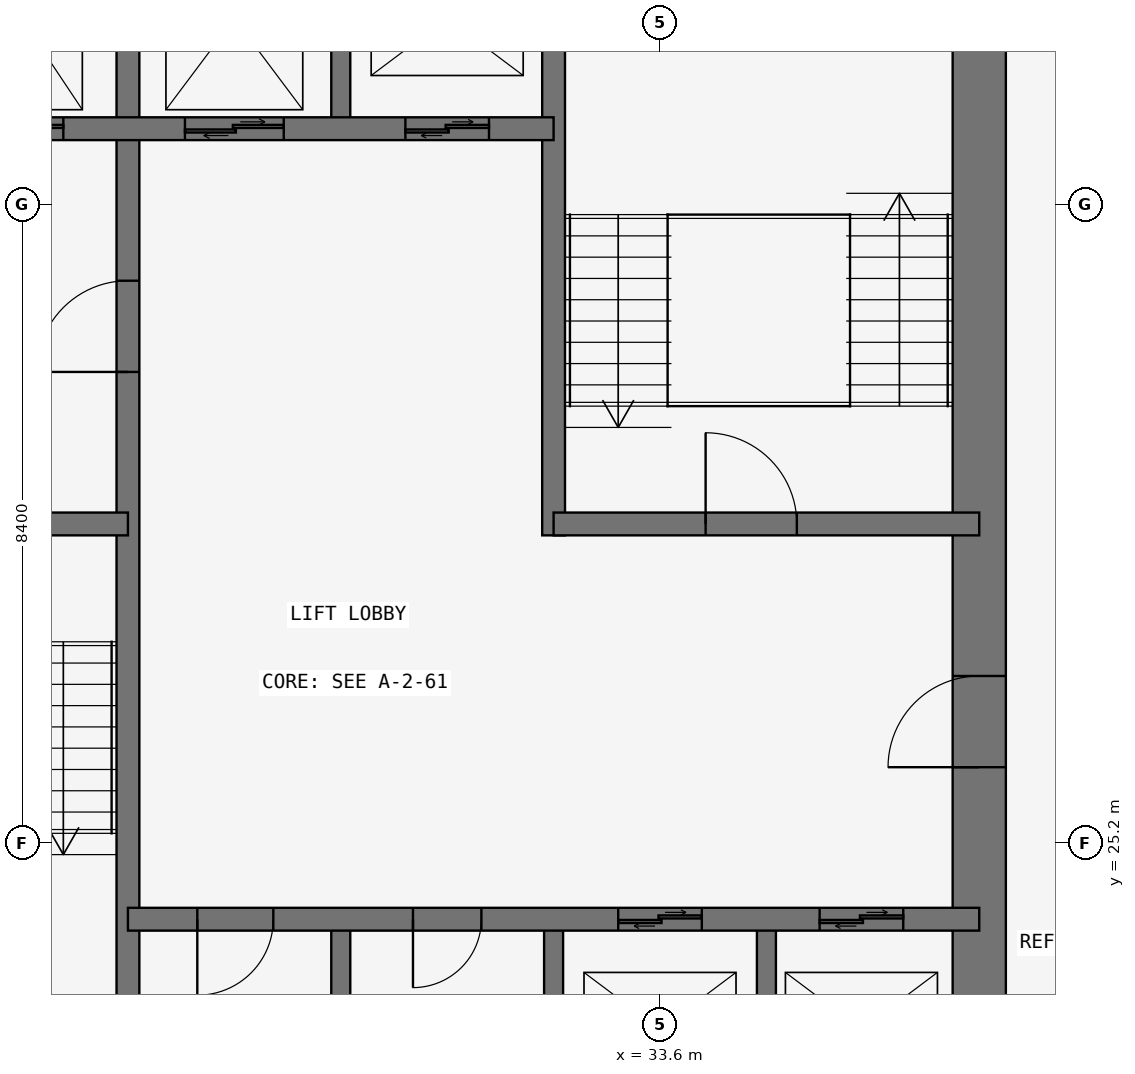
"""IFC4 building model, lengths in metres.
Left out: names, types, materials, properties, quantities, classifications, styles, units other than length and angle.
Written with IfcOpenShell. Run it as: python <this file> out.ifc"""

import sys

from ifc_helpers import new_model, si_unit, direction, frame, frame_2d, origin, place, context, subcontext, project, spatial, rectangle, extrude, element, fill, save


model = new_model("IFC4")
c1 = context("Model", 3, precision=1e-05, world=origin(), true_north=direction((0.0, 1.0)))
c2 = subcontext(c1, "Body", "Model", "MODEL_VIEW")
j1 = project(units=[si_unit("LENGTHUNIT", "METRE"), si_unit("PLANEANGLEUNIT", "RADIAN")], contexts=[c1])
p1 = place(None, origin())
s1 = spatial("IfcSite", under=j1, at=p1, CompositionType="ELEMENT")
p2 = place(p1, origin())
s2 = spatial("IfcBuilding", under=s1, at=p2, CompositionType="ELEMENT")
p3 = place(p2, frame((0.0, 0.0, 222.9)))
s3 = spatial("IfcBuildingStorey", under=s2, at=p3, CompositionType="ELEMENT", Elevation=222.9)
p4 = place(p3, frame((37.8, 21.0, 0.0), z_axis=(0.0, 0.0, 1.0), x_axis=(0.0, 1.0, 0.0)))
e1 = element("IfcWall", 1, at=p4, inside=s3, PredefinedType="SHEAR", context=c2, shape_type="SweptSolid", body=[
    extrude(rectangle(XDim=17.15, YDim=0.7, at=frame_2d((8.575, 0.0))), origin(), (0.0, 0.0, 1.0), 3.6),
])
p5 = place(p4, frame((5.2, 0.0, 0.0)))
e2 = element("IfcOpeningElement", 2, at=p5, cuts=e1, PredefinedType="OPENING", context=c2, shape_type="SweptSolid", body=[
    extrude(rectangle(XDim=1.2, YDim=2.1, at=frame_2d((0.6, 1.05))), frame((0.0, 0.36, 0.0), z_axis=(0.0, -1.0, 0.0), x_axis=(1.0, 0.0, 0.0)), (0.0, 0.0, 1.0), 0.72),
])
p6 = place(p3, frame((26.6, 21.0, 0.0), z_axis=(0.0, 0.0, 1.0), x_axis=(0.0, 1.0, 0.0)))
e3 = element("IfcWall", 3, at=p6, inside=s3, PredefinedType="SHEAR", context=c2, shape_type="SweptSolid", body=[
    extrude(rectangle(XDim=16.8, YDim=0.3, at=frame_2d((8.4, 0.0))), origin(), (0.0, 0.0, 1.0), 3.6),
])
p7 = place(p6, frame((10.4, 0.0, 0.0)))
e4 = element("IfcOpeningElement", 4, at=p7, cuts=e3, PredefinedType="OPENING", context=c2, shape_type="SweptSolid", body=[
    extrude(rectangle(XDim=1.2, YDim=2.1, at=frame_2d((0.6, 1.05))), frame((0.0, 0.16, 0.0), z_axis=(0.0, -1.0, 0.0), x_axis=(1.0, 0.0, 0.0)), (0.0, 0.0, 1.0), 0.32),
])
p8 = place(p3, frame((21.0, 29.4, 0.0), z_axis=(0.0, 0.0, 1.0), x_axis=(1.0, 0.0, 0.0)))
e5 = element("IfcWall", 5, at=p8, inside=s3, PredefinedType="SHEAR", context=c2, shape_type="SweptSolid", body=[
    extrude(rectangle(XDim=5.6, YDim=0.3, at=frame_2d((2.8, 0.0))), origin(), (0.0, 0.0, 1.0), 3.6),
])
p9 = place(p8, frame((2.3, 0.0, 0.0)))
e6 = element("IfcOpeningElement", 6, at=p9, cuts=e5, PredefinedType="OPENING", context=c2, shape_type="SweptSolid", body=[
    extrude(rectangle(XDim=1.2, YDim=2.1, at=frame_2d((0.6, 1.05))), frame((0.0, 0.16, 0.0), z_axis=(0.0, -1.0, 0.0), x_axis=(1.0, 0.0, 0.0)), (0.0, 0.0, 1.0), 0.32),
])
p10 = place(p3, frame((21.0, 34.6, 0.0), z_axis=(0.0, 0.0, 1.0), x_axis=(1.0, 0.0, 0.0)))
e7 = element("IfcWall", 7, at=p10, inside=s3, PredefinedType="SHEAR", context=c2, shape_type="SweptSolid", body=[
    extrude(rectangle(XDim=11.2, YDim=0.3, at=frame_2d((5.6, 0.0))), origin(), (0.0, 0.0, 1.0), 3.6),
])
p11 = place(p10, frame((9.25, 0.0, 0.0)))
e8 = element("IfcOpeningElement", 8, at=p11, cuts=e7, PredefinedType="OPENING", context=c2, shape_type="SweptSolid", body=[
    extrude(rectangle(XDim=1.1, YDim=2.1, at=frame_2d((0.55, 1.05))), frame((0.0, 0.16, 0.0), z_axis=(0.0, -1.0, 0.0), x_axis=(1.0, 0.0, 0.0)), (0.0, 0.0, 1.0), 0.32),
])
p12 = place(p10, frame((1.0, 0.0, 0.0)))
e9 = element("IfcOpeningElement", 9, at=p12, cuts=e7, PredefinedType="OPENING", context=c2, shape_type="SweptSolid", body=[
    extrude(rectangle(XDim=1.1, YDim=2.1, at=frame_2d((0.55, 1.05))), frame((0.0, 0.16, 0.0), z_axis=(0.0, -1.0, 0.0), x_axis=(1.0, 0.0, 0.0)), (0.0, 0.0, 1.0), 0.32),
])
p13 = place(p10, frame((3.65, 0.0, 0.0)))
e10 = element("IfcOpeningElement", 10, at=p13, cuts=e7, PredefinedType="OPENING", context=c2, shape_type="SweptSolid", body=[
    extrude(rectangle(XDim=1.1, YDim=2.1, at=frame_2d((0.55, 1.05))), frame((0.0, 0.16, 0.0), z_axis=(0.0, -1.0, 0.0), x_axis=(1.0, 0.0, 0.0)), (0.0, 0.0, 1.0), 0.32),
])
p14 = place(p10, frame((6.35, 0.0, 0.0)))
e11 = element("IfcOpeningElement", 11, at=p14, cuts=e7, PredefinedType="OPENING", context=c2, shape_type="SweptSolid", body=[
    extrude(rectangle(XDim=1.3, YDim=2.1, at=frame_2d((0.65, 1.05))), frame((0.0, 0.16, 0.0), z_axis=(0.0, -1.0, 0.0), x_axis=(1.0, 0.0, 0.0)), (0.0, 0.0, 1.0), 0.32),
])
p15 = place(p3, frame((26.6, 24.2, 0.0), z_axis=(0.0, 0.0, 1.0), x_axis=(1.0, 0.0, 0.0)))
e12 = element("IfcWall", 12, at=p15, inside=s3, PredefinedType="SHEAR", context=c2, shape_type="SweptSolid", body=[
    extrude(rectangle(XDim=11.2, YDim=0.3, at=frame_2d((5.6, 0.0))), origin(), (0.0, 0.0, 1.0), 3.6),
])
p16 = place(p15, frame((0.913, 0.0, 0.0)))
e13 = element("IfcOpeningElement", 13, at=p16, cuts=e12, PredefinedType="OPENING", context=c2, shape_type="SweptSolid", body=[
    extrude(rectangle(XDim=1.0, YDim=2.1, at=frame_2d((0.5, 1.05))), frame((0.0, 0.16, 0.0), z_axis=(0.0, -1.0, 0.0), x_axis=(1.0, 0.0, 0.0)), (0.0, 0.0, 1.0), 0.32),
])
p17 = place(p15, frame((3.75, 0.0, 0.0)))
e14 = element("IfcOpeningElement", 14, at=p17, cuts=e12, PredefinedType="OPENING", context=c2, shape_type="SweptSolid", body=[
    extrude(rectangle(XDim=0.9, YDim=2.1, at=frame_2d((0.45, 1.05))), frame((0.0, 0.16, 0.0), z_axis=(0.0, -1.0, 0.0), x_axis=(1.0, 0.0, 0.0)), (0.0, 0.0, 1.0), 0.32),
])
p18 = place(p15, frame((6.45, 0.0, 0.0)))
e15 = element("IfcOpeningElement", 15, at=p18, cuts=e12, PredefinedType="OPENING", context=c2, shape_type="SweptSolid", body=[
    extrude(rectangle(XDim=1.1, YDim=2.1, at=frame_2d((0.55, 1.05))), frame((0.0, 0.16, 0.0), z_axis=(0.0, -1.0, 0.0), x_axis=(1.0, 0.0, 0.0)), (0.0, 0.0, 1.0), 0.32),
])
p19 = place(p15, frame((9.1, 0.0, 0.0)))
e16 = element("IfcOpeningElement", 16, at=p19, cuts=e12, PredefinedType="OPENING", context=c2, shape_type="SweptSolid", body=[
    extrude(rectangle(XDim=1.1, YDim=2.1, at=frame_2d((0.55, 1.05))), frame((0.0, 0.16, 0.0), z_axis=(0.0, -1.0, 0.0), x_axis=(1.0, 0.0, 0.0)), (0.0, 0.0, 1.0), 0.32),
])
p20 = place(p3, frame((32.2, 29.25, 0.0), z_axis=(0.0, 0.0, 1.0), x_axis=(0.0, 1.0, 0.0)))
e17 = element("IfcWall", 17, at=p20, inside=s3, PredefinedType="SHEAR", context=c2, shape_type="SweptSolid", body=[
    extrude(rectangle(XDim=8.55, YDim=0.3, at=frame_2d((4.275, 0.0))), origin(), (0.0, 0.0, 1.0), 3.6),
])
p21 = place(p3, frame((32.2, 29.4, 0.0), z_axis=(0.0, 0.0, 1.0), x_axis=(1.0, 0.0, 0.0)))
e18 = element("IfcWall", 18, at=p21, inside=s3, PredefinedType="SHEAR", context=c2, shape_type="SweptSolid", body=[
    extrude(rectangle(XDim=5.6, YDim=0.3, at=frame_2d((2.8, 0.0))), origin(), (0.0, 0.0, 1.0), 3.6),
])
p22 = place(p21, frame((2.0, 0.0, 0.0)))
e19 = element("IfcOpeningElement", 19, at=p22, cuts=e18, PredefinedType="OPENING", context=c2, shape_type="SweptSolid", body=[
    extrude(rectangle(XDim=1.2, YDim=2.1, at=frame_2d((0.6, 1.05))), frame((0.0, 0.16, 0.0), z_axis=(0.0, -1.0, 0.0), x_axis=(1.0, 0.0, 0.0)), (0.0, 0.0, 1.0), 0.32),
])
for number, where, z_axis, x_axis in (
    (20, (29.4, 21.0, 0.0), (0.0, 0.0, 1.0), (0.0, 1.0, 0.0)),
    (21, (32.2, 21.0, 0.0), (0.0, 0.0, 1.0), (0.0, 1.0, 0.0)),
    (22, (35.0, 21.0, 0.0), (0.0, 0.0, 1.0), (0.0, 1.0, 0.0)),
    (23, (29.4, 34.6, 0.0), (0.0, 0.0, 1.0), (0.0, 1.0, 0.0)),
):
    element("IfcWall", number, at=place(p3, frame(where, z_axis=z_axis, x_axis=x_axis)), inside=s3, PredefinedType="SHEAR", context=c2, shape_type="SweptSolid", body=[
        extrude(rectangle(XDim=3.2, YDim=0.25, at=frame_2d((1.6, 0.0))), origin(), (0.0, 0.0, 1.0), 3.6),
    ])
p23 = place(p7, origin())
e24 = element("IfcDoor", 24, at=p23, inside=s3, OperationType="SINGLE_SWING_LEFT", PredefinedType="DOOR", context=c2, shape_type="SweptSolid", body=[
    extrude(rectangle(XDim=1.2, YDim=2.1, at=frame_2d((0.6, 1.05))), frame((0.0, 0.025, 0.0), z_axis=(0.0, -1.0, 0.0), x_axis=(1.0, 0.0, 0.0)), (0.0, 0.0, 1.0), 0.05),
])
fill(e4, e24)
p24 = place(p5, origin())
e25 = element("IfcDoor", 25, at=p24, inside=s3, OperationType="SINGLE_SWING_LEFT", PredefinedType="DOOR", context=c2, shape_type="SweptSolid", body=[
    extrude(rectangle(XDim=1.2, YDim=2.1, at=frame_2d((0.6, 1.05))), frame((0.0, 0.025, 0.0), z_axis=(0.0, -1.0, 0.0), x_axis=(1.0, 0.0, 0.0)), (0.0, 0.0, 1.0), 0.05),
])
fill(e2, e25)
p25 = place(p22, origin())
e26 = element("IfcDoor", 26, at=p25, inside=s3, OperationType="SINGLE_SWING_LEFT", PredefinedType="DOOR", context=c2, shape_type="SweptSolid", body=[
    extrude(rectangle(XDim=1.2, YDim=2.1, at=frame_2d((0.6, 1.05))), frame((0.0, 0.025, 0.0), z_axis=(0.0, -1.0, 0.0), x_axis=(1.0, 0.0, 0.0)), (0.0, 0.0, 1.0), 0.05),
])
fill(e19, e26)
p26 = place(p16, frame((1.0, 0.0, 0.0), z_axis=(0.0, 0.0, 1.0), x_axis=(-1.0, 0.0, 0.0)))
e27 = element("IfcDoor", 27, at=p26, inside=s3, OperationType="SINGLE_SWING_RIGHT", PredefinedType="DOOR", context=c2, shape_type="SweptSolid", body=[
    extrude(rectangle(XDim=1.0, YDim=2.1, at=frame_2d((0.5, 1.05))), frame((0.0, 0.025, 0.0), z_axis=(0.0, -1.0, 0.0), x_axis=(1.0, 0.0, 0.0)), (0.0, 0.0, 1.0), 0.05),
])
fill(e13, e27)
p27 = place(p17, frame((0.9, 0.0, 0.0), z_axis=(0.0, 0.0, 1.0), x_axis=(-1.0, 0.0, 0.0)))
e28 = element("IfcDoor", 28, at=p27, inside=s3, OperationType="SINGLE_SWING_RIGHT", PredefinedType="DOOR", context=c2, shape_type="SweptSolid", body=[
    extrude(rectangle(XDim=0.9, YDim=2.1, at=frame_2d((0.45, 1.05))), frame((0.0, 0.025, 0.0), z_axis=(0.0, -1.0, 0.0), x_axis=(1.0, 0.0, 0.0)), (0.0, 0.0, 1.0), 0.05),
])
fill(e14, e28)
p28 = place(p18, origin())
e29 = element("IfcDoor", 29, at=p28, inside=s3, OperationType="DOUBLE_DOOR_SLIDING", PredefinedType="DOOR", context=c2, shape_type="SweptSolid", body=[
    extrude(rectangle(XDim=1.1, YDim=2.1, at=frame_2d((0.55, 1.05))), frame((0.0, 0.025, 0.0), z_axis=(0.0, -1.0, 0.0), x_axis=(1.0, 0.0, 0.0)), (0.0, 0.0, 1.0), 0.05),
])
fill(e15, e29)
p29 = place(p19, origin())
e30 = element("IfcDoor", 30, at=p29, inside=s3, OperationType="DOUBLE_DOOR_SLIDING", PredefinedType="DOOR", context=c2, shape_type="SweptSolid", body=[
    extrude(rectangle(XDim=1.1, YDim=2.1, at=frame_2d((0.55, 1.05))), frame((0.0, 0.025, 0.0), z_axis=(0.0, -1.0, 0.0), x_axis=(1.0, 0.0, 0.0)), (0.0, 0.0, 1.0), 0.05),
])
fill(e16, e30)
p30 = place(p11, origin())
e31 = element("IfcDoor", 31, at=p30, inside=s3, OperationType="DOUBLE_DOOR_SLIDING", PredefinedType="DOOR", context=c2, shape_type="SweptSolid", body=[
    extrude(rectangle(XDim=1.1, YDim=2.1, at=frame_2d((0.55, 1.05))), frame((0.0, 0.025, 0.0), z_axis=(0.0, -1.0, 0.0), x_axis=(1.0, 0.0, 0.0)), (0.0, 0.0, 1.0), 0.05),
])
fill(e8, e31)
p31 = place(p13, origin())
e32 = element("IfcDoor", 32, at=p31, inside=s3, OperationType="DOUBLE_DOOR_SLIDING", PredefinedType="DOOR", context=c2, shape_type="SweptSolid", body=[
    extrude(rectangle(XDim=1.1, YDim=2.1, at=frame_2d((0.55, 1.05))), frame((0.0, 0.025, 0.0), z_axis=(0.0, -1.0, 0.0), x_axis=(1.0, 0.0, 0.0)), (0.0, 0.0, 1.0), 0.05),
])
fill(e10, e32)
p32 = place(p14, origin())
e33 = element("IfcDoor", 33, at=p32, inside=s3, OperationType="DOUBLE_DOOR_SLIDING", PredefinedType="DOOR", context=c2, shape_type="SweptSolid", body=[
    extrude(rectangle(XDim=1.3, YDim=2.1, at=frame_2d((0.65, 1.05))), frame((0.0, 0.025, 0.0), z_axis=(0.0, -1.0, 0.0), x_axis=(1.0, 0.0, 0.0)), (0.0, 0.0, 1.0), 0.05),
])
fill(e11, e33)
save(model, sys.argv[1])
